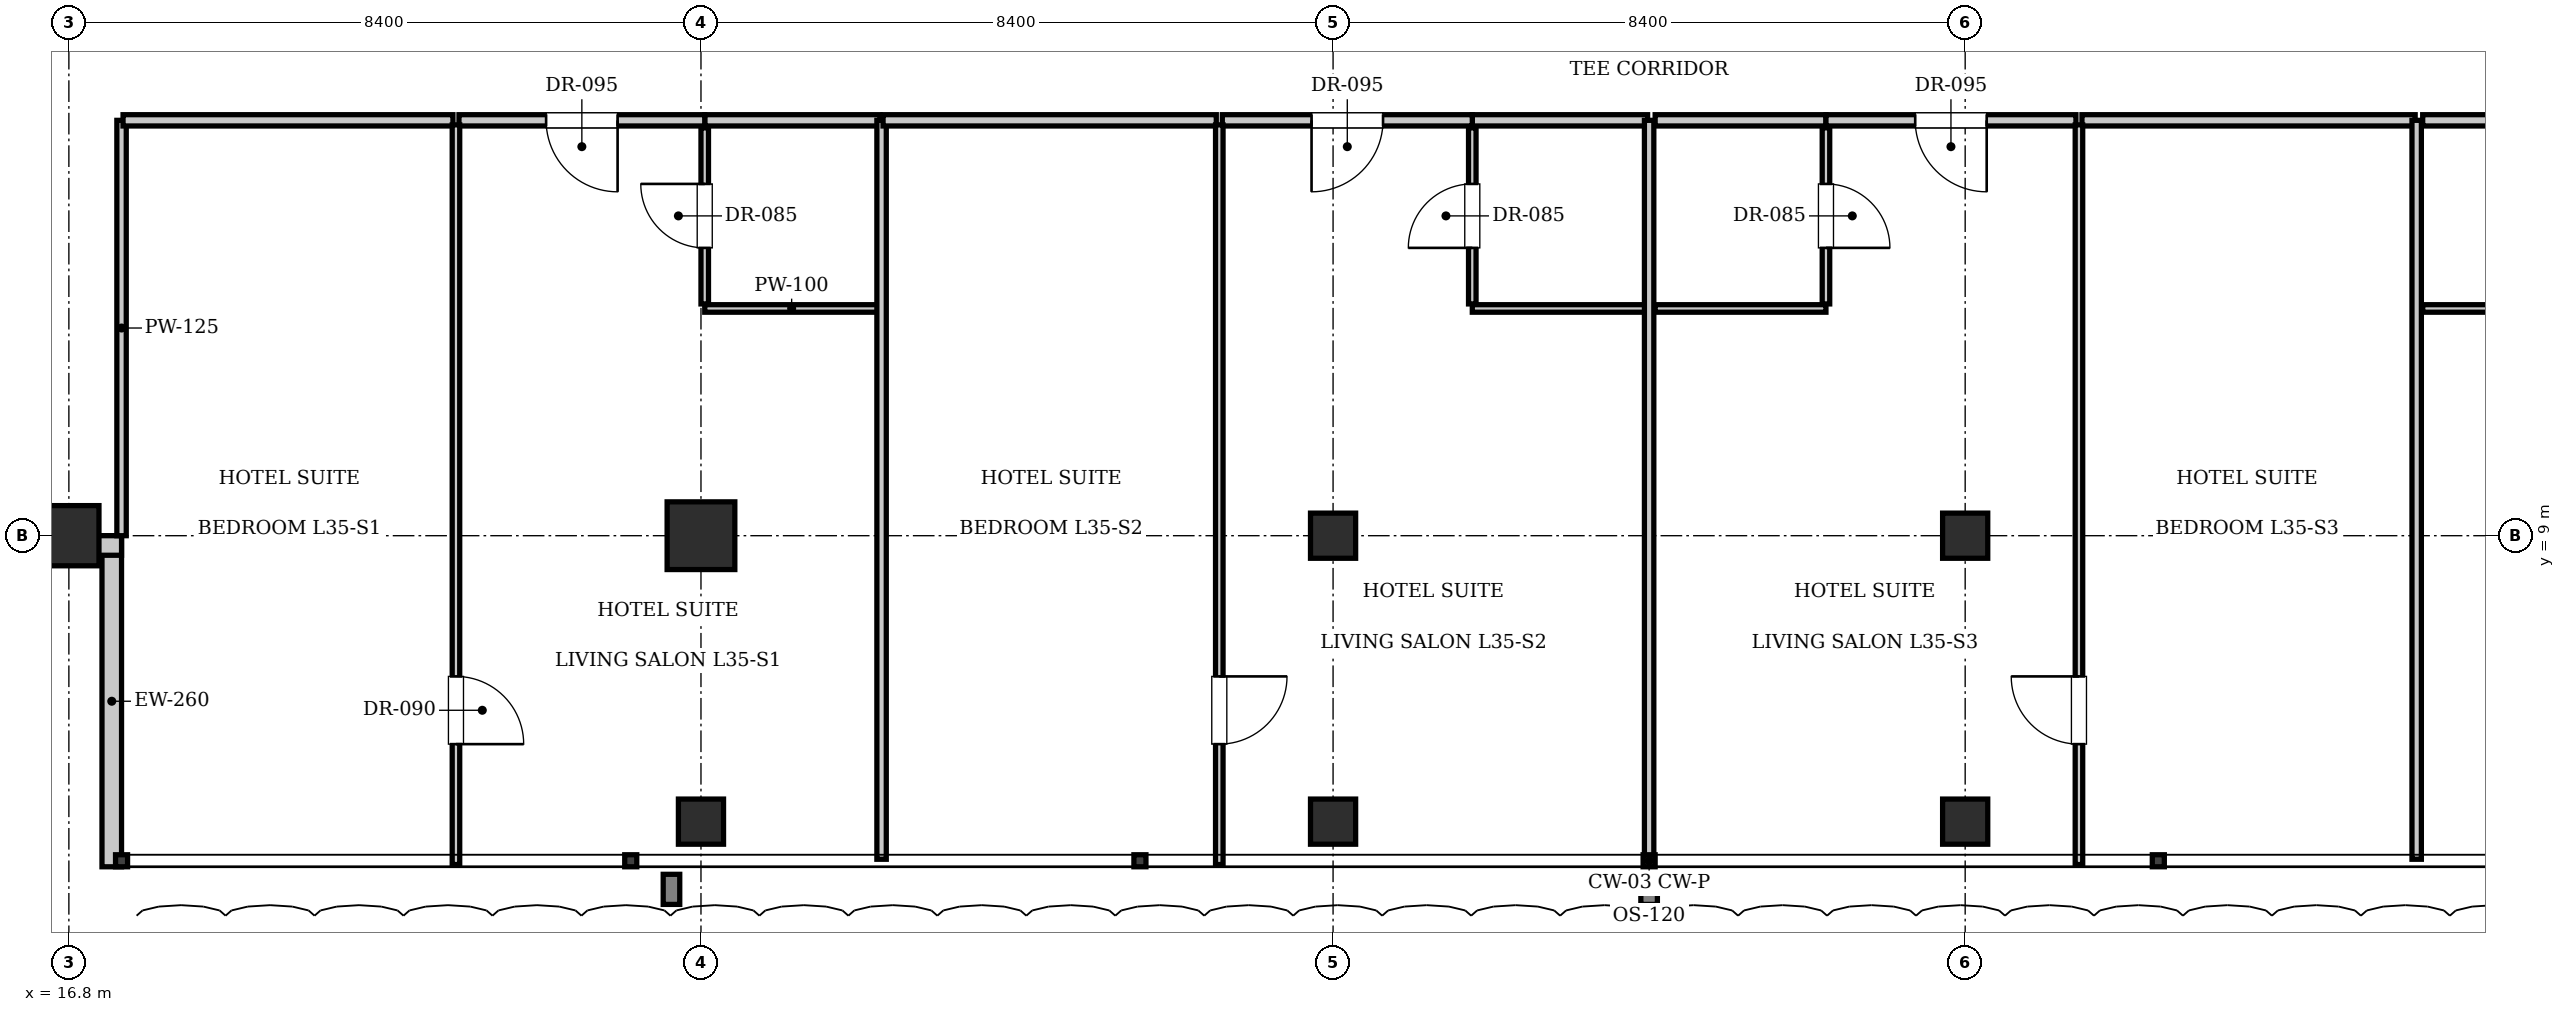
"""IFC4 building model, lengths in metres.
Left out: names, types, materials, properties, quantities, classifications, styles, units other than length and angle.
Written with IfcOpenShell. Run it as: python <this file> out.ifc"""

import sys

from ifc_helpers import new_model, si_unit, direction, frame, frame_2d, origin, origin_2d, place, context, subcontext, project, spatial, rectangle, i_section, extrude, element, fill, save


model = new_model("IFC4")
c1 = context("Model", 3, precision=1e-05, world=origin(), true_north=direction((0.0, 1.0)))
c2 = subcontext(c1, "Body", "Model", "MODEL_VIEW")
j1 = project(units=[si_unit("LENGTHUNIT", "METRE"), si_unit("PLANEANGLEUNIT", "RADIAN")], contexts=[c1])
p1 = place(None, origin())
s1 = spatial("IfcSite", under=j1, at=p1, CompositionType="ELEMENT")
p2 = place(p1, origin())
s2 = spatial("IfcBuilding", under=s1, at=p2, CompositionType="ELEMENT")
p3 = place(p2, frame((0.0, 0.0, 146.65)))
s3 = spatial("IfcBuildingStorey", under=s2, at=p3, CompositionType="ELEMENT", Elevation=146.65)
p4 = place(p3, frame((25.2, 9.0, 0.0), z_axis=(0.0, 0.0, 1.0), x_axis=(1.0, 0.0, 0.0)))
e1 = element("IfcColumn", 1, at=p4, inside=s3, PredefinedType="COLUMN", context=c2, shape_type="SweptSolid", body=[
    extrude(rectangle(XDim=0.9, YDim=0.9, at=origin_2d()), origin(), (0.0, 0.0, 1.0), 3.85),
])
for number, where, z_axis, x_axis in (
    (2, (33.6, 9.0, 0.0), (0.0, 0.0, 1.0), (1.0, 0.0, 0.0)),
    (3, (42.0, 9.0, 0.0), (0.0, 0.0, 1.0), (1.0, 0.0, 0.0)),
):
    element("IfcColumn", number, at=place(p3, frame(where, z_axis=z_axis, x_axis=x_axis)), inside=s3, PredefinedType="COLUMN", context=c2, shape_type="SweptSolid", body=[
        extrude(i_section(OverallWidth=0.6, OverallDepth=0.6, WebThickness=0.025, FlangeThickness=0.038, at=origin_2d()), origin(), (0.0, 0.0, 1.0), 3.85),
    ])
p5 = place(p3, frame((16.8, 9.0, 0.0), z_axis=(0.0, 0.0, 1.0), x_axis=(1.0, 0.0, 0.0)))
e4 = element("IfcColumn", 4, at=p5, inside=s3, PredefinedType="COLUMN", context=c2, shape_type="SweptSolid", body=[
    extrude(rectangle(XDim=0.8, YDim=0.8, at=origin_2d()), origin(), (0.0, 0.0, 1.0), 3.85),
])
for number, where, z_axis, x_axis in (
    (5, (25.2, 5.2, 0.0), (0.0, 0.0, 1.0), (1.0, 0.0, 0.0)),
    (6, (33.6, 5.2, 0.0), (0.0, 0.0, 1.0), (1.0, 0.0, 0.0)),
    (7, (42.0, 5.2, 0.0), (0.0, 0.0, 1.0), (1.0, 0.0, 0.0)),
):
    element("IfcColumn", number, at=place(p3, frame(where, z_axis=z_axis, x_axis=x_axis)), inside=s3, PredefinedType="COLUMN", context=c2, shape_type="SweptSolid", body=[
        extrude(i_section(OverallWidth=0.6, OverallDepth=0.6, WebThickness=0.025, FlangeThickness=0.038, at=origin_2d()), origin(), (0.0, 0.0, 1.0), 3.85),
    ])
p6 = place(p3, frame((17.37, 4.6, 0.0), z_axis=(0.0, 0.0, 1.0), x_axis=(0.0, 1.0, 0.0)))
e8 = element("IfcWall", 8, at=p6, inside=s3, PredefinedType="SOLIDWALL", context=c2, shape_type="SweptSolid", body=[
    extrude(rectangle(XDim=4.4, YDim=0.26, at=frame_2d((2.2, 0.0))), origin(), (0.0, 0.0, 1.0), 3.61),
])
p7 = place(p3, frame((17.5, 8.87, 0.0), z_axis=(0.0, 0.0, 1.0), x_axis=(-1.0, 0.0, 0.0)))
e9 = element("IfcWall", 9, at=p7, inside=s3, PredefinedType="SOLIDWALL", context=c2, shape_type="SweptSolid", body=[
    extrude(rectangle(XDim=4.4, YDim=0.26, at=frame_2d((2.2, 0.0))), origin(), (0.0, 0.0, 1.0), 2.998),
])
p8 = place(p3, frame((17.5, 9.0, 0.0), z_axis=(0.0, 0.0, 1.0), x_axis=(0.0, 1.0, 0.0)))
e10 = element("IfcWall", 10, at=p8, inside=s3, PredefinedType="PARTITIONING", context=c2, shape_type="SweptSolid", body=[
    extrude(rectangle(XDim=5.52, YDim=0.125, at=frame_2d((2.76, 0.0))), origin(), (0.0, 0.0, 1.0), 3.61),
])
p9 = place(p3, frame((25.25, 14.52, 0.0), z_axis=(0.0, 0.0, 1.0), x_axis=(1.0, 0.0, 0.0)))
e11 = element("IfcWall", 11, at=p9, inside=s3, PredefinedType="PARTITIONING", context=c2, shape_type="SweptSolid", body=[
    extrude(rectangle(XDim=2.33, YDim=0.15, at=frame_2d((1.165, 0.0))), origin(), (0.0, 0.0, 1.0), 3.61),
])
p10 = place(p3, frame((25.25, 12.02, 0.0), z_axis=(0.0, 0.0, 1.0), x_axis=(1.0, 0.0, 0.0)))
e12 = element("IfcWall", 12, at=p10, inside=s3, PredefinedType="PARTITIONING", context=c2, shape_type="SweptSolid", body=[
    extrude(rectangle(XDim=2.31, YDim=0.1, at=frame_2d((1.155, 0.0))), origin(), (0.0, 0.0, 1.0), 3.61),
])
p11 = place(p3, frame((25.25, 12.08, 0.0), z_axis=(0.0, 0.0, 1.0), x_axis=(0.0, 1.0, 0.0)))
e13 = element("IfcWall", 13, at=p11, inside=s3, PredefinedType="PARTITIONING", context=c2, shape_type="SweptSolid", body=[
    extrude(rectangle(XDim=2.34, YDim=0.1, at=frame_2d((1.17, 0.0))), origin(), (0.0, 0.0, 1.0), 2.998),
])
p12 = place(p11, frame((0.745, 0.0, 0.0)))
e14 = element("IfcOpeningElement", 14, at=p12, cuts=e13, PredefinedType="OPENING", context=c2, shape_type="SweptSolid", body=[
    extrude(rectangle(XDim=0.85, YDim=2.1, at=frame_2d((0.425, 1.05))), frame((0.0, 0.06, 0.0), z_axis=(0.0, -1.0, 0.0), x_axis=(1.0, 0.0, 0.0)), (0.0, 0.0, 1.0), 0.12),
])
p13 = place(p3, frame((17.52, 14.52, 0.0), z_axis=(0.0, 0.0, 1.0), x_axis=(1.0, 0.0, 0.0)))
e15 = element("IfcWall", 15, at=p13, inside=s3, PredefinedType="PARTITIONING", context=c2, shape_type="SweptSolid", body=[
    extrude(rectangle(XDim=4.384, YDim=0.15, at=frame_2d((2.192, 0.0))), origin(), (0.0, 0.0, 1.0), 3.61),
])
p14 = place(p3, frame((21.984, 14.52, 0.0), z_axis=(0.0, 0.0, 1.0), x_axis=(1.0, 0.0, 0.0)))
e16 = element("IfcWall", 16, at=p14, inside=s3, PredefinedType="PARTITIONING", context=c2, shape_type="SweptSolid", body=[
    extrude(rectangle(XDim=3.266, YDim=0.15, at=frame_2d((1.633, 0.0))), origin(), (0.0, 0.0, 1.0), 3.61),
])
p15 = place(p14, frame((1.158, 0.0, 0.0)))
e17 = element("IfcOpeningElement", 17, at=p15, cuts=e16, PredefinedType="OPENING", context=c2, shape_type="SweptSolid", body=[
    extrude(rectangle(XDim=0.95, YDim=2.15, at=frame_2d((0.475, 1.075))), frame((0.0, 0.085, 0.0), z_axis=(0.0, -1.0, 0.0), x_axis=(1.0, 0.0, 0.0)), (0.0, 0.0, 1.0), 0.17),
])
p16 = place(p3, frame((21.944, 4.63, 0.0), z_axis=(0.0, 0.0, 1.0), x_axis=(0.0, 1.0, 0.0)))
e18 = element("IfcWall", 18, at=p16, inside=s3, PredefinedType="PARTITIONING", context=c2, shape_type="SweptSolid", body=[
    extrude(rectangle(XDim=9.83, YDim=0.1, at=frame_2d((4.915, 0.0))), origin(), (0.0, 0.0, 1.0), 3.61),
])
p17 = place(p16, frame((1.6, 0.0, 0.0)))
e19 = element("IfcOpeningElement", 19, at=p17, cuts=e18, PredefinedType="OPENING", context=c2, shape_type="SweptSolid", body=[
    extrude(rectangle(XDim=0.9, YDim=2.1, at=frame_2d((0.45, 1.05))), frame((0.0, 0.06, 0.0), z_axis=(0.0, -1.0, 0.0), x_axis=(1.0, 0.0, 0.0)), (0.0, 0.0, 1.0), 0.12),
])
p18 = place(p3, frame((27.6, 4.7, 0.0), z_axis=(0.0, 0.0, 1.0), x_axis=(0.0, 1.0, 0.0)))
e20 = element("IfcWall", 20, at=p18, inside=s3, PredefinedType="PARTITIONING", context=c2, shape_type="SweptSolid", body=[
    extrude(rectangle(XDim=9.82, YDim=0.125, at=frame_2d((4.91, 0.0))), origin(), (0.0, 0.0, 1.0), 3.61),
])
p19 = place(p3, frame((35.45, 14.52, 0.0), z_axis=(0.0, 0.0, 1.0), x_axis=(1.0, 0.0, 0.0)))
e21 = element("IfcWall", 21, at=p19, inside=s3, PredefinedType="PARTITIONING", context=c2, shape_type="SweptSolid", body=[
    extrude(rectangle(XDim=2.33, YDim=0.15, at=frame_2d((1.165, 0.0))), origin(), (0.0, 0.0, 1.0), 3.61),
])
p20 = place(p3, frame((35.45, 12.02, 0.0), z_axis=(0.0, 0.0, 1.0), x_axis=(1.0, 0.0, 0.0)))
e22 = element("IfcWall", 22, at=p20, inside=s3, PredefinedType="PARTITIONING", context=c2, shape_type="SweptSolid", body=[
    extrude(rectangle(XDim=2.31, YDim=0.1, at=frame_2d((1.155, 0.0))), origin(), (0.0, 0.0, 1.0), 3.61),
])
p21 = place(p3, frame((35.45, 12.08, 0.0), z_axis=(0.0, 0.0, 1.0), x_axis=(0.0, 1.0, 0.0)))
e23 = element("IfcWall", 23, at=p21, inside=s3, PredefinedType="PARTITIONING", context=c2, shape_type="SweptSolid", body=[
    extrude(rectangle(XDim=2.34, YDim=0.1, at=frame_2d((1.17, 0.0))), origin(), (0.0, 0.0, 1.0), 3.61),
])
p22 = place(p21, frame((0.745, 0.0, 0.0)))
e24 = element("IfcOpeningElement", 24, at=p22, cuts=e23, PredefinedType="OPENING", context=c2, shape_type="SweptSolid", body=[
    extrude(rectangle(XDim=0.85, YDim=2.1, at=frame_2d((0.425, 1.05))), frame((0.0, 0.06, 0.0), z_axis=(0.0, -1.0, 0.0), x_axis=(1.0, 0.0, 0.0)), (0.0, 0.0, 1.0), 0.12),
])
p23 = place(p3, frame((27.62, 14.52, 0.0), z_axis=(0.0, 0.0, 1.0), x_axis=(1.0, 0.0, 0.0)))
e25 = element("IfcWall", 25, at=p23, inside=s3, PredefinedType="PARTITIONING", context=c2, shape_type="SweptSolid", body=[
    extrude(rectangle(XDim=4.428, YDim=0.15, at=frame_2d((2.214, 0.0))), origin(), (0.0, 0.0, 1.0), 3.61),
])
p24 = place(p3, frame((32.128, 14.52, 0.0), z_axis=(0.0, 0.0, 1.0), x_axis=(1.0, 0.0, 0.0)))
e26 = element("IfcWall", 26, at=p24, inside=s3, PredefinedType="PARTITIONING", context=c2, shape_type="SweptSolid", body=[
    extrude(rectangle(XDim=3.322, YDim=0.15, at=frame_2d((1.661, 0.0))), origin(), (0.0, 0.0, 1.0), 3.61),
])
p25 = place(p24, frame((1.186, 0.0, 0.0)))
e27 = element("IfcOpeningElement", 27, at=p25, cuts=e26, PredefinedType="OPENING", context=c2, shape_type="SweptSolid", body=[
    extrude(rectangle(XDim=0.95, YDim=2.15, at=frame_2d((0.475, 1.075))), frame((0.0, 0.085, 0.0), z_axis=(0.0, -1.0, 0.0), x_axis=(1.0, 0.0, 0.0)), (0.0, 0.0, 1.0), 0.17),
])
p26 = place(p3, frame((32.088, 4.63, 0.0), z_axis=(0.0, 0.0, 1.0), x_axis=(0.0, 1.0, 0.0)))
e28 = element("IfcWall", 28, at=p26, inside=s3, PredefinedType="PARTITIONING", context=c2, shape_type="SweptSolid", body=[
    extrude(rectangle(XDim=9.83, YDim=0.1, at=frame_2d((4.915, 0.0))), origin(), (0.0, 0.0, 1.0), 3.61),
])
p27 = place(p26, frame((1.6, 0.0, 0.0)))
e29 = element("IfcOpeningElement", 29, at=p27, cuts=e28, PredefinedType="OPENING", context=c2, shape_type="SweptSolid", body=[
    extrude(rectangle(XDim=0.9, YDim=2.1, at=frame_2d((0.45, 1.05))), frame((0.0, 0.06, 0.0), z_axis=(0.0, -1.0, 0.0), x_axis=(1.0, 0.0, 0.0)), (0.0, 0.0, 1.0), 0.12),
])
p28 = place(p3, frame((37.8, 4.7, 0.0), z_axis=(0.0, 0.0, 1.0), x_axis=(0.0, 1.0, 0.0)))
e30 = element("IfcWall", 30, at=p28, inside=s3, PredefinedType="PARTITIONING", context=c2, shape_type="SweptSolid", body=[
    extrude(rectangle(XDim=9.82, YDim=0.125, at=frame_2d((4.91, 0.0))), origin(), (0.0, 0.0, 1.0), 3.293),
])
p29 = place(p3, frame((37.88, 14.52, 0.0), z_axis=(0.0, 0.0, 1.0), x_axis=(1.0, 0.0, 0.0)))
e31 = element("IfcWall", 31, at=p29, inside=s3, PredefinedType="PARTITIONING", context=c2, shape_type="SweptSolid", body=[
    extrude(rectangle(XDim=2.27, YDim=0.15, at=frame_2d((1.135, 0.0))), origin(), (0.0, 0.0, 1.0), 3.61),
])
p30 = place(p3, frame((37.88, 12.02, 0.0), z_axis=(0.0, 0.0, 1.0), x_axis=(1.0, 0.0, 0.0)))
e32 = element("IfcWall", 32, at=p30, inside=s3, PredefinedType="PARTITIONING", context=c2, shape_type="SweptSolid", body=[
    extrude(rectangle(XDim=2.27, YDim=0.1, at=frame_2d((1.135, 0.0))), origin(), (0.0, 0.0, 1.0), 3.61),
])
p31 = place(p3, frame((40.15, 12.08, 0.0), z_axis=(0.0, 0.0, 1.0), x_axis=(0.0, 1.0, 0.0)))
e33 = element("IfcWall", 33, at=p31, inside=s3, PredefinedType="PARTITIONING", context=c2, shape_type="SweptSolid", body=[
    extrude(rectangle(XDim=2.34, YDim=0.1, at=frame_2d((1.17, 0.0))), origin(), (0.0, 0.0, 1.0), 3.61),
])
p32 = place(p31, frame((0.745, 0.0, 0.0)))
e34 = element("IfcOpeningElement", 34, at=p32, cuts=e33, PredefinedType="OPENING", context=c2, shape_type="SweptSolid", body=[
    extrude(rectangle(XDim=0.85, YDim=2.1, at=frame_2d((0.425, 1.05))), frame((0.0, 0.06, 0.0), z_axis=(0.0, -1.0, 0.0), x_axis=(1.0, 0.0, 0.0)), (0.0, 0.0, 1.0), 0.12),
])
p33 = place(p3, frame((40.15, 14.52, 0.0), z_axis=(0.0, 0.0, 1.0), x_axis=(1.0, 0.0, 0.0)))
e35 = element("IfcWall", 35, at=p33, inside=s3, PredefinedType="PARTITIONING", context=c2, shape_type="SweptSolid", body=[
    extrude(rectangle(XDim=3.322, YDim=0.15, at=frame_2d((1.661, 0.0))), origin(), (0.0, 0.0, 1.0), 3.61),
])
p34 = place(p33, frame((1.186, 0.0, 0.0)))
e36 = element("IfcOpeningElement", 36, at=p34, cuts=e35, PredefinedType="OPENING", context=c2, shape_type="SweptSolid", body=[
    extrude(rectangle(XDim=0.95, YDim=2.15, at=frame_2d((0.475, 1.075))), frame((0.0, 0.085, 0.0), z_axis=(0.0, -1.0, 0.0), x_axis=(1.0, 0.0, 0.0)), (0.0, 0.0, 1.0), 0.17),
])
p35 = place(p3, frame((43.552, 14.52, 0.0), z_axis=(0.0, 0.0, 1.0), x_axis=(1.0, 0.0, 0.0)))
e37 = element("IfcWall", 37, at=p35, inside=s3, PredefinedType="PARTITIONING", context=c2, shape_type="SweptSolid", body=[
    extrude(rectangle(XDim=4.428, YDim=0.15, at=frame_2d((2.214, 0.0))), origin(), (0.0, 0.0, 1.0), 3.61),
])
p36 = place(p3, frame((43.512, 4.63, 0.0), z_axis=(0.0, 0.0, 1.0), x_axis=(0.0, 1.0, 0.0)))
e38 = element("IfcWall", 38, at=p36, inside=s3, PredefinedType="PARTITIONING", context=c2, shape_type="SweptSolid", body=[
    extrude(rectangle(XDim=9.83, YDim=0.1, at=frame_2d((4.915, 0.0))), origin(), (0.0, 0.0, 1.0), 3.61),
])
p37 = place(p36, frame((1.6, 0.0, 0.0)))
e39 = element("IfcOpeningElement", 39, at=p37, cuts=e38, PredefinedType="OPENING", context=c2, shape_type="SweptSolid", body=[
    extrude(rectangle(XDim=0.9, YDim=2.1, at=frame_2d((0.45, 1.05))), frame((0.0, 0.06, 0.0), z_axis=(0.0, -1.0, 0.0), x_axis=(1.0, 0.0, 0.0)), (0.0, 0.0, 1.0), 0.12),
])
p38 = place(p3, frame((48.0, 4.7, 0.0), z_axis=(0.0, 0.0, 1.0), x_axis=(0.0, 1.0, 0.0)))
e40 = element("IfcWall", 40, at=p38, inside=s3, PredefinedType="PARTITIONING", context=c2, shape_type="SweptSolid", body=[
    extrude(rectangle(XDim=9.82, YDim=0.125, at=frame_2d((4.91, 0.0))), origin(), (0.0, 0.0, 1.0), 3.61),
])
p39 = place(p3, frame((48.08, 14.52, 0.0), z_axis=(0.0, 0.0, 1.0), x_axis=(1.0, 0.0, 0.0)))
e41 = element("IfcWall", 41, at=p39, inside=s3, PredefinedType="PARTITIONING", context=c2, shape_type="SweptSolid", body=[
    extrude(rectangle(XDim=2.27, YDim=0.15, at=frame_2d((1.135, 0.0))), origin(), (0.0, 0.0, 1.0), 3.61),
])
p40 = place(p3, frame((48.08, 12.02, 0.0), z_axis=(0.0, 0.0, 1.0), x_axis=(1.0, 0.0, 0.0)))
e42 = element("IfcWall", 42, at=p40, inside=s3, PredefinedType="PARTITIONING", context=c2, shape_type="SweptSolid", body=[
    extrude(rectangle(XDim=2.27, YDim=0.1, at=frame_2d((1.135, 0.0))), origin(), (0.0, 0.0, 1.0), 3.61),
])
p41 = place(p12, origin())
e43 = element("IfcDoor", 43, at=p41, inside=s3, OperationType="SINGLE_SWING_RIGHT", PredefinedType="DOOR", context=c2, shape_type="SweptSolid", body=[
    extrude(rectangle(XDim=0.85, YDim=2.1, at=frame_2d((0.425, 1.05))), frame((0.0, 0.025, 0.0), z_axis=(0.0, -1.0, 0.0), x_axis=(1.0, 0.0, 0.0)), (0.0, 0.0, 1.0), 0.05),
])
fill(e14, e43)
p42 = place(p15, frame((0.95, 0.0, 0.0), z_axis=(0.0, 0.0, 1.0), x_axis=(-1.0, 0.0, 0.0)))
e44 = element("IfcDoor", 44, at=p42, inside=s3, OperationType="SINGLE_SWING_LEFT", PredefinedType="DOOR", context=c2, shape_type="SweptSolid", body=[
    extrude(rectangle(XDim=0.95, YDim=2.15, at=frame_2d((0.475, 1.075))), frame((0.0, 0.025, 0.0), z_axis=(0.0, -1.0, 0.0), x_axis=(1.0, 0.0, 0.0)), (0.0, 0.0, 1.0), 0.05),
])
fill(e17, e44)
p43 = place(p17, frame((0.9, 0.0, 0.0), z_axis=(0.0, 0.0, 1.0), x_axis=(-1.0, 0.0, 0.0)))
e45 = element("IfcDoor", 45, at=p43, inside=s3, OperationType="SINGLE_SWING_RIGHT", PredefinedType="DOOR", context=c2, shape_type="SweptSolid", body=[
    extrude(rectangle(XDim=0.9, YDim=2.1, at=frame_2d((0.45, 1.05))), frame((0.0, 0.025, 0.0), z_axis=(0.0, -1.0, 0.0), x_axis=(1.0, 0.0, 0.0)), (0.0, 0.0, 1.0), 0.05),
])
fill(e19, e45)
p44 = place(p22, origin())
e46 = element("IfcDoor", 46, at=p44, inside=s3, OperationType="SINGLE_SWING_LEFT", PredefinedType="DOOR", context=c2, shape_type="SweptSolid", body=[
    extrude(rectangle(XDim=0.85, YDim=2.1, at=frame_2d((0.425, 1.05))), frame((0.0, 0.025, 0.0), z_axis=(0.0, -1.0, 0.0), x_axis=(1.0, 0.0, 0.0)), (0.0, 0.0, 1.0), 0.05),
])
fill(e24, e46)
p45 = place(p25, frame((0.95, 0.0, 0.0), z_axis=(0.0, 0.0, 1.0), x_axis=(-1.0, 0.0, 0.0)))
e47 = element("IfcDoor", 47, at=p45, inside=s3, OperationType="SINGLE_SWING_RIGHT", PredefinedType="DOOR", context=c2, shape_type="SweptSolid", body=[
    extrude(rectangle(XDim=0.95, YDim=2.15, at=frame_2d((0.475, 1.075))), frame((0.0, 0.025, 0.0), z_axis=(0.0, -1.0, 0.0), x_axis=(1.0, 0.0, 0.0)), (0.0, 0.0, 1.0), 0.05),
])
fill(e27, e47)
p46 = place(p27, frame((0.9, 0.0, 0.0), z_axis=(0.0, 0.0, 1.0), x_axis=(-1.0, 0.0, 0.0)))
e48 = element("IfcDoor", 48, at=p46, inside=s3, OperationType="SINGLE_SWING_LEFT", PredefinedType="DOOR", context=c2, shape_type="SweptSolid", body=[
    extrude(rectangle(XDim=0.9, YDim=2.1, at=frame_2d((0.45, 1.05))), frame((0.0, 0.025, 0.0), z_axis=(0.0, -1.0, 0.0), x_axis=(1.0, 0.0, 0.0)), (0.0, 0.0, 1.0), 0.05),
])
fill(e29, e48)
p47 = place(p32, frame((0.85, 0.0, 0.0), z_axis=(0.0, 0.0, 1.0), x_axis=(-1.0, 0.0, 0.0)))
e49 = element("IfcDoor", 49, at=p47, inside=s3, OperationType="SINGLE_SWING_RIGHT", PredefinedType="DOOR", context=c2, shape_type="SweptSolid", body=[
    extrude(rectangle(XDim=0.85, YDim=2.1, at=frame_2d((0.425, 1.05))), frame((0.0, 0.025, 0.0), z_axis=(0.0, -1.0, 0.0), x_axis=(1.0, 0.0, 0.0)), (0.0, 0.0, 1.0), 0.05),
])
fill(e34, e49)
p48 = place(p34, frame((0.95, 0.0, 0.0), z_axis=(0.0, 0.0, 1.0), x_axis=(-1.0, 0.0, 0.0)))
e50 = element("IfcDoor", 50, at=p48, inside=s3, OperationType="SINGLE_SWING_LEFT", PredefinedType="DOOR", context=c2, shape_type="SweptSolid", body=[
    extrude(rectangle(XDim=0.95, YDim=2.15, at=frame_2d((0.475, 1.075))), frame((0.0, 0.025, 0.0), z_axis=(0.0, -1.0, 0.0), x_axis=(1.0, 0.0, 0.0)), (0.0, 0.0, 1.0), 0.05),
])
fill(e36, e50)
p49 = place(p37, origin())
e51 = element("IfcDoor", 51, at=p49, inside=s3, OperationType="SINGLE_SWING_RIGHT", PredefinedType="DOOR", context=c2, shape_type="SweptSolid", body=[
    extrude(rectangle(XDim=0.9, YDim=2.1, at=frame_2d((0.45, 1.05))), frame((0.0, 0.025, 0.0), z_axis=(0.0, -1.0, 0.0), x_axis=(1.0, 0.0, 0.0)), (0.0, 0.0, 1.0), 0.05),
])
fill(e39, e51)
save(model, sys.argv[1])
